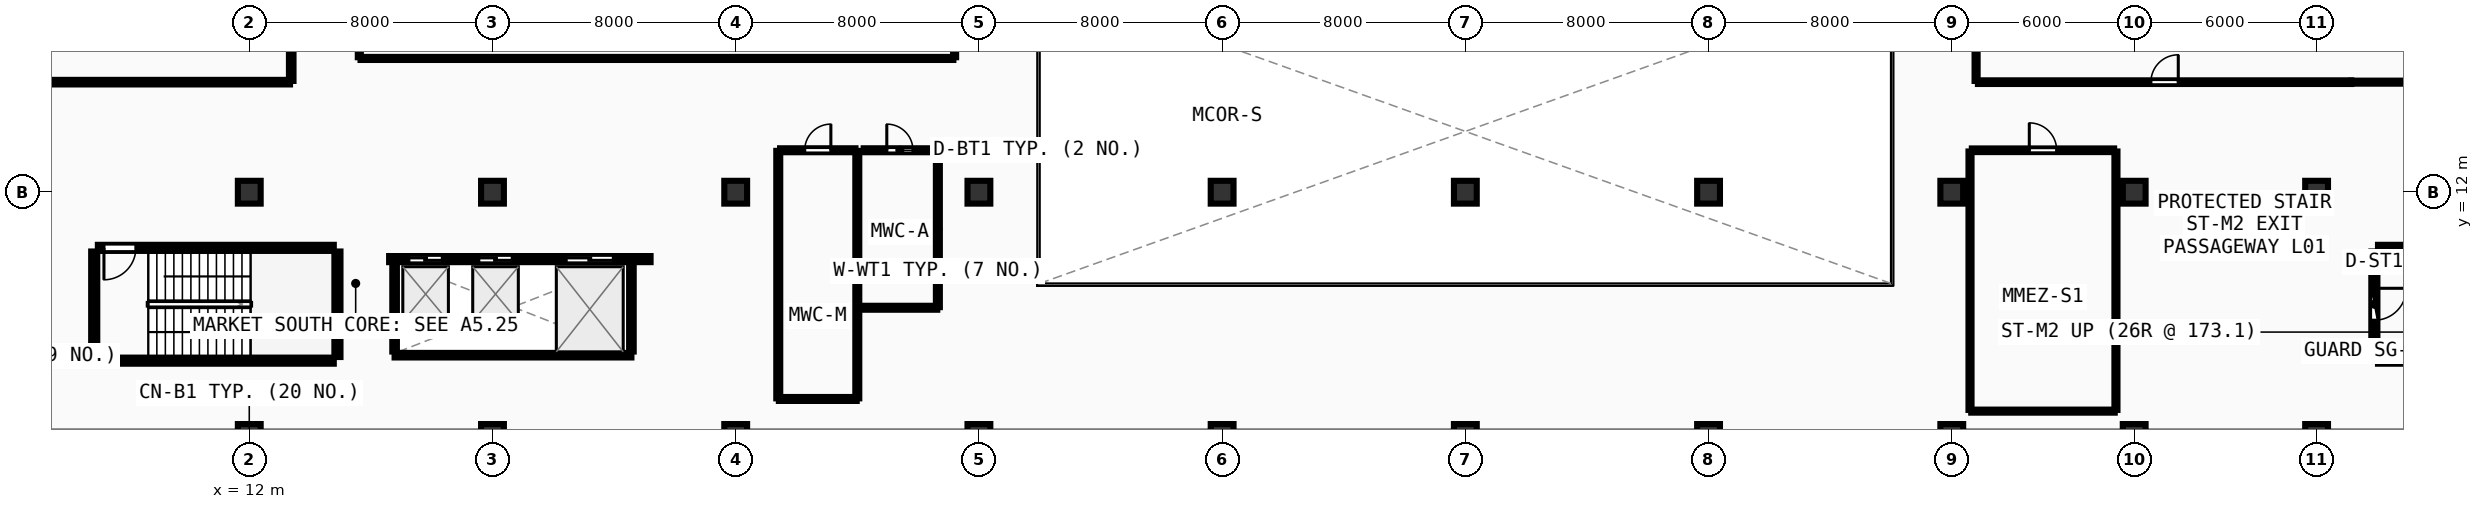
"""IFC4 building model, lengths in metres.
Left out: names, types, materials, properties, quantities, classifications, styles, units other than length and angle.
Written with IfcOpenShell. Run it as: python <this file> out.ifc"""

import sys

from ifc_helpers import new_model, si_unit, direction, frame, frame_2d, origin, origin_2d, place, context, subcontext, project, spatial, rectangle, extrude, element, fill, save


model = new_model("IFC4")
c1 = context("Model", 3, precision=1e-05, world=origin(), true_north=direction((0.0, 1.0)))
c2 = subcontext(c1, "Body", "Model", "MODEL_VIEW")
j1 = project(units=[si_unit("LENGTHUNIT", "METRE"), si_unit("PLANEANGLEUNIT", "RADIAN")], contexts=[c1])
p1 = place(None, origin())
s1 = spatial("IfcSite", under=j1, at=p1, CompositionType="ELEMENT")
p2 = place(p1, origin())
s2 = spatial("IfcBuilding", under=s1, at=p2, CompositionType="ELEMENT")
p3 = place(p2, frame((0.0, 0.0, 4.5)))
s3 = spatial("IfcBuildingStorey", under=s2, at=p3, CompositionType="ELEMENT", Elevation=4.5)
for number, where, z_axis, x_axis in (
    (1, (12.0, 4.0, 0.0), (0.0, 0.0, 1.0), (1.0, 0.0, 0.0)),
    (2, (12.0, 12.0, 0.0), (0.0, 0.0, 1.0), (1.0, 0.0, 0.0)),
    (3, (20.0, 4.0, 0.0), (0.0, 0.0, 1.0), (1.0, 0.0, 0.0)),
    (4, (20.0, 12.0, 0.0), (0.0, 0.0, 1.0), (1.0, 0.0, 0.0)),
    (5, (28.0, 4.0, 0.0), (0.0, 0.0, 1.0), (1.0, 0.0, 0.0)),
    (6, (28.0, 12.0, 0.0), (0.0, 0.0, 1.0), (1.0, 0.0, 0.0)),
    (7, (36.0, 4.0, 0.0), (0.0, 0.0, 1.0), (1.0, 0.0, 0.0)),
    (8, (36.0, 12.0, 0.0), (0.0, 0.0, 1.0), (1.0, 0.0, 0.0)),
    (9, (44.0, 4.0, 0.0), (0.0, 0.0, 1.0), (1.0, 0.0, 0.0)),
    (10, (44.0, 12.0, 0.0), (0.0, 0.0, 1.0), (1.0, 0.0, 0.0)),
    (11, (52.0, 4.0, 0.0), (0.0, 0.0, 1.0), (1.0, 0.0, 0.0)),
    (12, (52.0, 12.0, 0.0), (0.0, 0.0, 1.0), (1.0, 0.0, 0.0)),
    (13, (60.0, 4.0, 0.0), (0.0, 0.0, 1.0), (1.0, 0.0, 0.0)),
    (14, (60.0, 12.0, 0.0), (0.0, 0.0, 1.0), (1.0, 0.0, 0.0)),
    (15, (68.0, 4.0, 0.0), (0.0, 0.0, 1.0), (1.0, 0.0, 0.0)),
    (16, (68.0, 12.0, 0.0), (0.0, 0.0, 1.0), (1.0, 0.0, 0.0)),
    (17, (74.0, 4.0, 0.0), (0.0, 0.0, 1.0), (1.0, 0.0, 0.0)),
    (18, (74.0, 12.0, 0.0), (0.0, 0.0, 1.0), (1.0, 0.0, 0.0)),
    (19, (80.0, 4.0, 0.0), (0.0, 0.0, 1.0), (1.0, 0.0, 0.0)),
    (20, (80.0, 12.0, 0.0), (0.0, 0.0, 1.0), (1.0, 0.0, 0.0)),
):
    element("IfcColumn", number, at=place(p3, frame(where, z_axis=z_axis, x_axis=x_axis)), inside=s3, PredefinedType="COLUMN", context=c2, shape_type="SweptSolid", body=[
        extrude(rectangle(XDim=0.75, YDim=0.75, at=origin_2d()), origin(), (0.0, 0.0, 1.0), 4.5),
    ])
p4 = place(p3, frame((7.02, 6.46, 0.0), z_axis=(0.0, 0.0, 1.0), x_axis=(1.0, 0.0, 0.0)))
e21 = element("IfcWall", 21, at=p4, inside=s3, PredefinedType="SHEAR", context=c2, shape_type="SweptSolid", body=[
    extrude(rectangle(XDim=7.76, YDim=0.2, at=frame_2d((3.88, 0.0))), origin(), (0.0, 0.0, 1.0), 4.24),
])
p5 = place(p3, frame((14.9, 6.58, 0.0), z_axis=(0.0, 0.0, 1.0), x_axis=(0.0, 1.0, 0.0)))
e22 = element("IfcWall", 22, at=p5, inside=s3, PredefinedType="SHEAR", context=c2, shape_type="SweptSolid", body=[
    extrude(rectangle(XDim=3.47, YDim=0.2, at=frame_2d((1.735, 0.0))), origin(), (0.0, 0.0, 1.0), 4.24),
])
p6 = place(p3, frame((14.78, 10.17, 0.0), z_axis=(0.0, 0.0, 1.0), x_axis=(-1.0, 0.0, 0.0)))
e23 = element("IfcWall", 23, at=p6, inside=s3, PredefinedType="SHEAR", context=c2, shape_type="SweptSolid", body=[
    extrude(rectangle(XDim=7.76, YDim=0.2, at=frame_2d((3.88, 0.0))), origin(), (0.0, 0.0, 1.0), 4.24),
])
p7 = place(p6, frame((6.51, 0.0, 0.0)))
e24 = element("IfcOpeningElement", 24, at=p7, cuts=e23, PredefinedType="OPENING", context=c2, shape_type="SweptSolid", body=[
    extrude(rectangle(XDim=1.05, YDim=2.1, at=frame_2d((0.525, 1.05))), frame((0.0, 0.11, 0.0), z_axis=(0.0, -1.0, 0.0), x_axis=(1.0, 0.0, 0.0)), (0.0, 0.0, 1.0), 0.22),
])
p8 = place(p3, frame((6.9, 10.05, 0.0), z_axis=(0.0, 0.0, 1.0), x_axis=(0.0, -1.0, 0.0)))
e25 = element("IfcWall", 25, at=p8, inside=s3, PredefinedType="SHEAR", context=c2, shape_type="SweptSolid", body=[
    extrude(rectangle(XDim=3.47, YDim=0.2, at=frame_2d((1.735, 0.0))), origin(), (0.0, 0.0, 1.0), 4.24),
])
for number, where, z_axis, x_axis in (
    (26, (82.02, 6.46, 0.0), (0.0, 0.0, 1.0), (1.0, 0.0, 0.0)),
    (27, (89.78, 10.17, 0.0), (0.0, 0.0, 1.0), (-1.0, 0.0, 0.0)),
):
    element("IfcWall", number, at=place(p3, frame(where, z_axis=z_axis, x_axis=x_axis)), inside=s3, PredefinedType="SHEAR", context=c2, shape_type="SweptSolid", body=[
        extrude(rectangle(XDim=7.76, YDim=0.2, at=frame_2d((3.88, 0.0))), origin(), (0.0, 0.0, 1.0), 4.24),
    ])
p9 = place(p3, frame((81.9, 10.05, 0.0), z_axis=(0.0, 0.0, 1.0), x_axis=(0.0, -1.0, 0.0)))
e28 = element("IfcWall", 28, at=p9, inside=s3, PredefinedType="SHEAR", context=c2, shape_type="SweptSolid", body=[
    extrude(rectangle(XDim=3.47, YDim=0.2, at=frame_2d((1.735, 0.0))), origin(), (0.0, 0.0, 1.0), 4.24),
])
p10 = place(p9, frame((1.21, 0.0, 0.0)))
e29 = element("IfcOpeningElement", 29, at=p10, cuts=e28, PredefinedType="OPENING", context=c2, shape_type="SweptSolid", body=[
    extrude(rectangle(XDim=1.05, YDim=2.1, at=frame_2d((0.525, 1.05))), frame((0.0, 0.11, 0.0), z_axis=(0.0, -1.0, 0.0), x_axis=(1.0, 0.0, 0.0)), (0.0, 0.0, 1.0), 0.22),
])
p11 = place(p3, frame((16.6, 9.8, 0.0), z_axis=(0.0, 0.0, 1.0), x_axis=(1.0, 0.0, 0.0)))
e30 = element("IfcWall", 30, at=p11, inside=s3, PredefinedType="SOLIDWALL", context=c2, shape_type="SweptSolid", body=[
    extrude(rectangle(XDim=8.6, YDim=0.2, at=frame_2d((4.3, 0.0))), origin(), (0.0, 0.0, 1.0), 3.425),
])
p12 = place(p11, frame((0.65, 0.0, 0.0)))
e31 = element("IfcOpeningElement", 31, at=p12, cuts=e30, PredefinedType="OPENING", context=c2, shape_type="SweptSolid", body=[
    extrude(rectangle(XDim=1.1, YDim=2.1, at=frame_2d((0.55, 1.05))), frame((0.0, 0.11, 0.0), z_axis=(0.0, -1.0, 0.0), x_axis=(1.0, 0.0, 0.0)), (0.0, 0.0, 1.0), 0.22),
])
p13 = place(p11, frame((2.95, 0.0, 0.0)))
e32 = element("IfcOpeningElement", 32, at=p13, cuts=e30, PredefinedType="OPENING", context=c2, shape_type="SweptSolid", body=[
    extrude(rectangle(XDim=1.1, YDim=2.1, at=frame_2d((0.55, 1.05))), frame((0.0, 0.11, 0.0), z_axis=(0.0, -1.0, 0.0), x_axis=(1.0, 0.0, 0.0)), (0.0, 0.0, 1.0), 0.22),
])
p14 = place(p11, frame((5.825, 0.0, 0.0)))
e33 = element("IfcOpeningElement", 33, at=p14, cuts=e30, PredefinedType="OPENING", context=c2, shape_type="SweptSolid", body=[
    extrude(rectangle(XDim=1.55, YDim=2.2, at=frame_2d((0.775, 1.1))), frame((0.0, 0.11, 0.0), z_axis=(0.0, -1.0, 0.0), x_axis=(1.0, 0.0, 0.0)), (0.0, 0.0, 1.0), 0.22),
])
p15 = place(p3, frame((16.78, 6.64, 0.0), z_axis=(0.0, 0.0, 1.0), x_axis=(1.0, 0.0, 0.0)))
e34 = element("IfcWall", 34, at=p15, inside=s3, PredefinedType="PARTITIONING", context=c2, shape_type="SweptSolid", body=[
    extrude(rectangle(XDim=7.79, YDim=0.15, at=frame_2d((3.895, 0.0))), origin(), (0.0, 0.0, 1.0), 3.425),
])
for number, where, z_axis, x_axis in (
    (35, (16.78, 6.76, 0.0), (0.0, 0.0, 1.0), (0.0, 1.0, 0.0)),
    (36, (24.57, 6.76, 0.0), (0.0, 0.0, 1.0), (0.0, 1.0, 0.0)),
):
    element("IfcWall", number, at=place(p3, frame(where, z_axis=z_axis, x_axis=x_axis)), inside=s3, PredefinedType="PARTITIONING", context=c2, shape_type="SweptSolid", body=[
        extrude(rectangle(XDim=2.91, YDim=0.15, at=frame_2d((1.455, 0.0))), origin(), (0.0, 0.0, 1.0), 4.23),
    ])
p16 = place(p3, frame((29.46, 13.38, 0.0), z_axis=(0.0, 0.0, 1.0), x_axis=(1.0, 0.0, 0.0)))
e37 = element("IfcWall", 37, at=p16, inside=s3, PredefinedType="PLUMBINGWALL", context=c2, shape_type="SweptSolid", body=[
    extrude(rectangle(XDim=2.48, YDim=0.13, at=frame_2d((1.24, 0.0))), origin(), (0.0, 0.0, 1.0), 4.19),
])
p17 = place(p16, frame((0.81, 0.0, 0.0)))
e38 = element("IfcOpeningElement", 38, at=p17, cuts=e37, PredefinedType="OPENING", context=c2, shape_type="SweptSolid", body=[
    extrude(rectangle(XDim=0.86, YDim=2.05, at=frame_2d((0.43, 1.025))), frame((0.0, 0.075, 0.0), z_axis=(0.0, -1.0, 0.0), x_axis=(1.0, 0.0, 0.0)), (0.0, 0.0, 1.0), 0.15),
])
p18 = place(p3, frame((32.21, 13.38, 0.0), z_axis=(0.0, 0.0, 1.0), x_axis=(1.0, 0.0, 0.0)))
e39 = element("IfcWall", 39, at=p18, inside=s3, PredefinedType="PLUMBINGWALL", context=c2, shape_type="SweptSolid", body=[
    extrude(rectangle(XDim=2.38, YDim=0.13, at=frame_2d((1.19, 0.0))), origin(), (0.0, 0.0, 1.0), 4.19),
])
p19 = place(p18, frame((0.76, 0.0, 0.0)))
e40 = element("IfcOpeningElement", 40, at=p19, cuts=e39, PredefinedType="OPENING", context=c2, shape_type="SweptSolid", body=[
    extrude(rectangle(XDim=0.86, YDim=2.05, at=frame_2d((0.43, 1.025))), frame((0.0, 0.075, 0.0), z_axis=(0.0, -1.0, 0.0), x_axis=(1.0, 0.0, 0.0)), (0.0, 0.0, 1.0), 0.15),
])
p20 = place(p3, frame((68.66, 13.38, 0.0), z_axis=(0.0, 0.0, 1.0), x_axis=(1.0, 0.0, 0.0)))
e41 = element("IfcWall", 41, at=p20, inside=s3, PredefinedType="PARTITIONING", context=c2, shape_type="SweptSolid", body=[
    extrude(rectangle(XDim=4.68, YDim=0.12, at=frame_2d((2.34, 0.0))), origin(), (0.0, 0.0, 1.0), 4.19),
])
p21 = place(p20, frame((1.89, 0.0, 0.0)))
e42 = element("IfcOpeningElement", 42, at=p21, cuts=e41, PredefinedType="OPENING", context=c2, shape_type="SweptSolid", body=[
    extrude(rectangle(XDim=0.9, YDim=2.08, at=frame_2d((0.45, 1.04))), frame((0.0, 0.07, 0.0), z_axis=(0.0, -1.0, 0.0), x_axis=(1.0, 0.0, 0.0)), (0.0, 0.0, 1.0), 0.14),
])
p22 = place(p3, frame((68.86, 15.62, 0.0), z_axis=(0.0, 0.0, 1.0), x_axis=(1.0, 0.0, 0.0)))
e43 = element("IfcWall", 43, at=p22, inside=s3, PredefinedType="PARTITIONING", context=c2, shape_type="SweptSolid", body=[
    extrude(rectangle(XDim=12.28, YDim=0.12, at=frame_2d((6.14, 0.0))), origin(), (0.0, 0.0, 1.0), 3.425),
])
p23 = place(p22, frame((5.69, 0.0, 0.0)))
e44 = element("IfcOpeningElement", 44, at=p23, cuts=e43, PredefinedType="OPENING", context=c2, shape_type="SweptSolid", body=[
    extrude(rectangle(XDim=0.9, YDim=2.08, at=frame_2d((0.45, 1.04))), frame((0.0, 0.07, 0.0), z_axis=(0.0, -1.0, 0.0), x_axis=(1.0, 0.0, 0.0)), (0.0, 0.0, 1.0), 0.14),
])
p24 = place(p3, frame((29.42, 5.2, 0.0), z_axis=(0.0, 0.0, 1.0), x_axis=(1.0, 0.0, 0.0)))
e45 = element("IfcWall", 45, at=p24, inside=s3, PredefinedType="PLUMBINGWALL", context=c2, shape_type="SweptSolid", body=[
    extrude(rectangle(XDim=2.56, YDim=0.13, at=frame_2d((1.28, 0.0))), origin(), (0.0, 0.0, 1.0), 4.19),
])
for number, where, z_axis, x_axis in (
    (46, (32.0, 5.22, 0.0), (0.0, 0.0, 1.0), (0.0, 1.0, 0.0)),
    (47, (29.4, 13.36, 0.0), (0.0, 0.0, 1.0), (0.0, -1.0, 0.0)),
):
    element("IfcWall", number, at=place(p3, frame(where, z_axis=z_axis, x_axis=x_axis)), inside=s3, PredefinedType="PLUMBINGWALL", context=c2, shape_type="SweptSolid", body=[
        extrude(rectangle(XDim=8.14, YDim=0.13, at=frame_2d((4.07, 0.0))), origin(), (0.0, 0.0, 1.0), 3.425),
    ])
p25 = place(p3, frame((32.17, 8.2, 0.0), z_axis=(0.0, 0.0, 1.0), x_axis=(1.0, 0.0, 0.0)))
e48 = element("IfcWall", 48, at=p25, inside=s3, PredefinedType="PLUMBINGWALL", context=c2, shape_type="SweptSolid", body=[
    extrude(rectangle(XDim=2.46, YDim=0.13, at=frame_2d((1.23, 0.0))), origin(), (0.0, 0.0, 1.0), 4.19),
])
p26 = place(p3, frame((34.65, 8.22, 0.0), z_axis=(0.0, 0.0, 1.0), x_axis=(0.0, 1.0, 0.0)))
e49 = element("IfcWall", 49, at=p26, inside=s3, PredefinedType="PLUMBINGWALL", context=c2, shape_type="SweptSolid", body=[
    extrude(rectangle(XDim=5.14, YDim=0.13, at=frame_2d((2.57, 0.0))), origin(), (0.0, 0.0, 1.0), 3.425),
])
p27 = place(p3, frame((15.66, 16.4, 0.0), z_axis=(0.0, 0.0, 1.0), x_axis=(1.0, 0.0, 0.0)))
e50 = element("IfcWall", 50, at=p27, inside=s3, PredefinedType="PARTITIONING", context=c2, shape_type="SweptSolid", body=[
    extrude(rectangle(XDim=19.5, YDim=0.1, at=frame_2d((9.75, 0.0))), origin(), (0.0, 0.0, 1.0), 3.425),
])
p28 = place(p3, frame((35.2, 16.44, 0.0), z_axis=(0.0, 0.0, 1.0), x_axis=(0.0, 1.0, 0.0)))
e51 = element("IfcWall", 51, at=p28, inside=s3, PredefinedType="PARTITIONING", context=c2, shape_type="SweptSolid", body=[
    extrude(rectangle(XDim=22.72, YDim=0.1, at=frame_2d((11.36, 0.0))), origin(), (0.0, 0.0, 1.0), 3.425),
])
p29 = place(p3, frame((15.62, 21.46, 0.0), z_axis=(0.0, 0.0, 1.0), x_axis=(0.0, -1.0, 0.0)))
e52 = element("IfcWall", 52, at=p29, inside=s3, PredefinedType="PARTITIONING", context=c2, shape_type="SweptSolid", body=[
    extrude(rectangle(XDim=5.02, YDim=0.1, at=frame_2d((2.51, 0.0))), origin(), (0.0, 0.0, 1.0), 3.425),
])
p30 = place(p3, frame((68.64, 4.8, 0.0), z_axis=(0.0, 0.0, 1.0), x_axis=(1.0, 0.0, 0.0)))
e53 = element("IfcWall", 53, at=p30, inside=s3, PredefinedType="PARTITIONING", context=c2, shape_type="SweptSolid", body=[
    extrude(rectangle(XDim=4.72, YDim=0.1, at=frame_2d((2.36, 0.0))), origin(), (0.0, 0.0, 1.0), 4.19),
])
for number, where, z_axis, x_axis in (
    (54, (73.4, 4.84, 0.0), (0.0, 0.0, 1.0), (0.0, 1.0, 0.0)),
    (55, (68.6, 13.34, 0.0), (0.0, 0.0, 1.0), (0.0, -1.0, 0.0)),
):
    element("IfcWall", number, at=place(p3, frame(where, z_axis=z_axis, x_axis=x_axis)), inside=s3, PredefinedType="PARTITIONING", context=c2, shape_type="SweptSolid", body=[
        extrude(rectangle(XDim=8.5, YDim=0.1, at=frame_2d((4.25, 0.0))), origin(), (0.0, 0.0, 1.0), 3.425),
    ])
p31 = place(p3, frame((81.14, 15.62, 0.0), z_axis=(0.0, 0.0, 1.0), x_axis=(1.0, 0.0, 0.0)))
e56 = element("IfcWall", 56, at=p31, inside=s3, PredefinedType="PARTITIONING", context=c2, shape_type="SweptSolid", body=[
    extrude(rectangle(XDim=14.02, YDim=0.1, at=frame_2d((7.01, 0.0))), origin(), (0.0, 0.0, 1.0), 3.425),
])
p32 = place(p3, frame((68.8, 25.16, 0.0), z_axis=(0.0, 0.0, 1.0), x_axis=(0.0, -1.0, 0.0)))
e57 = element("IfcWall", 57, at=p32, inside=s3, PredefinedType="PARTITIONING", context=c2, shape_type="SweptSolid", body=[
    extrude(rectangle(XDim=9.5, YDim=0.1, at=frame_2d((4.75, 0.0))), origin(), (0.0, 0.0, 1.0), 3.425),
])
p33 = place(p3, frame((4.84, 15.62, 0.0), z_axis=(0.0, 0.0, 1.0), x_axis=(1.0, 0.0, 0.0)))
e58 = element("IfcWall", 58, at=p33, inside=s3, PredefinedType="PARTITIONING", context=c2, shape_type="SweptSolid", body=[
    extrude(rectangle(XDim=8.5, YDim=0.15, at=frame_2d((4.25, 0.0))), origin(), (0.0, 0.0, 1.0), 3.425),
])
p34 = place(p3, frame((13.38, 15.66, 0.0), z_axis=(0.0, 0.0, 1.0), x_axis=(0.0, 1.0, 0.0)))
e59 = element("IfcWall", 59, at=p34, inside=s3, PredefinedType="PARTITIONING", context=c2, shape_type="SweptSolid", body=[
    extrude(rectangle(XDim=5.8, YDim=0.15, at=frame_2d((2.9, 0.0))), origin(), (0.0, 0.0, 1.0), 3.425),
])
p35 = place(p7, origin())
e60 = element("IfcDoor", 60, at=p35, inside=s3, OperationType="SINGLE_SWING_RIGHT", PredefinedType="DOOR", context=c2, shape_type="SweptSolid", body=[
    extrude(rectangle(XDim=1.05, YDim=2.1, at=frame_2d((0.525, 1.05))), frame((0.0, 0.025, 0.0), z_axis=(0.0, -1.0, 0.0), x_axis=(1.0, 0.0, 0.0)), (0.0, 0.0, 1.0), 0.05),
])
fill(e24, e60)
p36 = place(p10, origin())
e61 = element("IfcDoor", 61, at=p36, inside=s3, OperationType="SINGLE_SWING_LEFT", PredefinedType="DOOR", context=c2, shape_type="SweptSolid", body=[
    extrude(rectangle(XDim=1.05, YDim=2.1, at=frame_2d((0.525, 1.05))), frame((0.0, 0.025, 0.0), z_axis=(0.0, -1.0, 0.0), x_axis=(1.0, 0.0, 0.0)), (0.0, 0.0, 1.0), 0.05),
])
fill(e29, e61)
p37 = place(p12, origin())
e62 = element("IfcDoor", 62, at=p37, inside=s3, OperationType="DOUBLE_DOOR_SLIDING", PredefinedType="DOOR", context=c2, shape_type="SweptSolid", body=[
    extrude(rectangle(XDim=1.1, YDim=2.1, at=frame_2d((0.55, 1.05))), frame((0.0, 0.025, 0.0), z_axis=(0.0, -1.0, 0.0), x_axis=(1.0, 0.0, 0.0)), (0.0, 0.0, 1.0), 0.05),
])
fill(e31, e62)
p38 = place(p13, origin())
e63 = element("IfcDoor", 63, at=p38, inside=s3, OperationType="DOUBLE_DOOR_SLIDING", PredefinedType="DOOR", context=c2, shape_type="SweptSolid", body=[
    extrude(rectangle(XDim=1.1, YDim=2.1, at=frame_2d((0.55, 1.05))), frame((0.0, 0.025, 0.0), z_axis=(0.0, -1.0, 0.0), x_axis=(1.0, 0.0, 0.0)), (0.0, 0.0, 1.0), 0.05),
])
fill(e32, e63)
p39 = place(p14, origin())
e64 = element("IfcDoor", 64, at=p39, inside=s3, OperationType="DOUBLE_DOOR_SLIDING", PredefinedType="DOOR", context=c2, shape_type="SweptSolid", body=[
    extrude(rectangle(XDim=1.55, YDim=2.2, at=frame_2d((0.775, 1.1))), frame((0.0, 0.025, 0.0), z_axis=(0.0, -1.0, 0.0), x_axis=(1.0, 0.0, 0.0)), (0.0, 0.0, 1.0), 0.05),
])
fill(e33, e64)
p40 = place(p17, origin())
e65 = element("IfcDoor", 65, at=p40, inside=s3, OperationType="SINGLE_SWING_RIGHT", PredefinedType="DOOR", context=c2, shape_type="SweptSolid", body=[
    extrude(rectangle(XDim=0.86, YDim=2.05, at=frame_2d((0.43, 1.025))), frame((0.0, 0.025, 0.0), z_axis=(0.0, -1.0, 0.0), x_axis=(1.0, 0.0, 0.0)), (0.0, 0.0, 1.0), 0.05),
])
fill(e38, e65)
p41 = place(p19, origin())
e66 = element("IfcDoor", 66, at=p41, inside=s3, OperationType="SINGLE_SWING_LEFT", PredefinedType="DOOR", context=c2, shape_type="SweptSolid", body=[
    extrude(rectangle(XDim=0.86, YDim=2.05, at=frame_2d((0.43, 1.025))), frame((0.0, 0.025, 0.0), z_axis=(0.0, -1.0, 0.0), x_axis=(1.0, 0.0, 0.0)), (0.0, 0.0, 1.0), 0.05),
])
fill(e40, e66)
p42 = place(p21, origin())
e67 = element("IfcDoor", 67, at=p42, inside=s3, OperationType="SINGLE_SWING_LEFT", PredefinedType="DOOR", context=c2, shape_type="SweptSolid", body=[
    extrude(rectangle(XDim=0.9, YDim=2.08, at=frame_2d((0.45, 1.04))), frame((0.0, 0.025, 0.0), z_axis=(0.0, -1.0, 0.0), x_axis=(1.0, 0.0, 0.0)), (0.0, 0.0, 1.0), 0.05),
])
fill(e42, e67)
p43 = place(p23, origin())
e68 = element("IfcDoor", 68, at=p43, inside=s3, OperationType="SINGLE_SWING_RIGHT", PredefinedType="DOOR", context=c2, shape_type="SweptSolid", body=[
    extrude(rectangle(XDim=0.9, YDim=2.08, at=frame_2d((0.45, 1.04))), frame((0.0, 0.025, 0.0), z_axis=(0.0, -1.0, 0.0), x_axis=(1.0, 0.0, 0.0)), (0.0, 0.0, 1.0), 0.05),
])
fill(e44, e68)
save(model, sys.argv[1])
